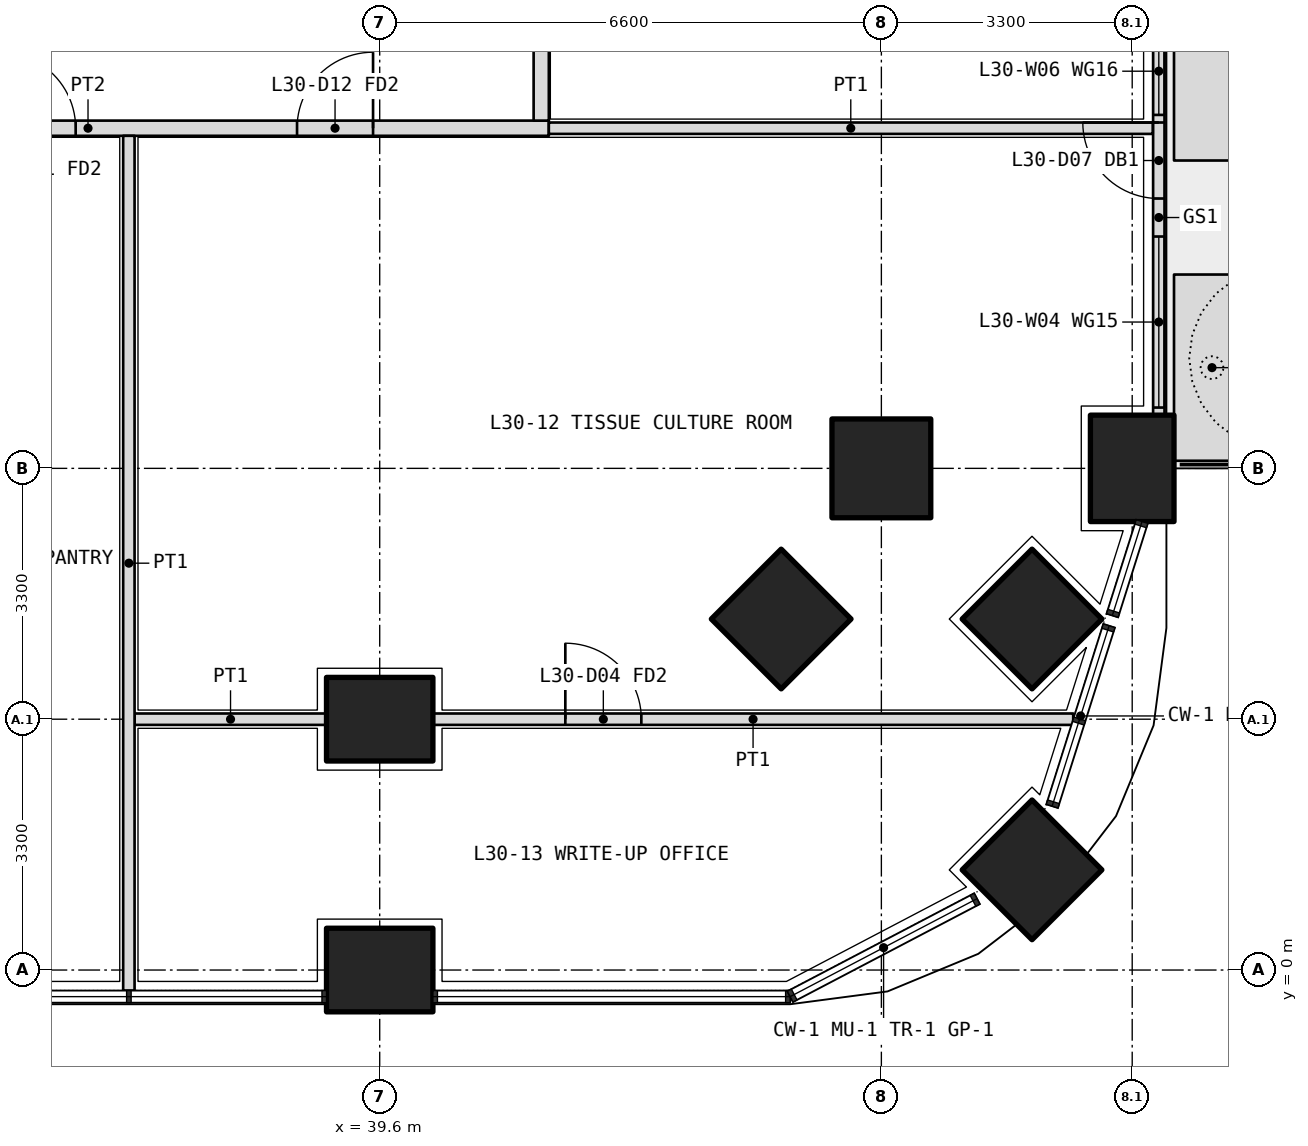
"""IFC4 building model, lengths in metres.
Left out: names, types, materials, properties, quantities, classifications, styles, units other than length and angle.
Written with IfcOpenShell. Run it as: python <this file> out.ifc"""

import sys

from ifc_helpers import new_model, si_unit, direction, frame, frame_2d, origin, origin_2d, place, context, subcontext, project, spatial, polyline, rectangle, outline, extrude, element, fill, save


model = new_model("IFC4")
c1 = context("Model", 3, precision=1e-05, world=origin(), true_north=direction((0.0, 1.0)))
c2 = subcontext(c1, "Body", "Model", "MODEL_VIEW")
j1 = project(units=[si_unit("LENGTHUNIT", "METRE"), si_unit("PLANEANGLEUNIT", "RADIAN")], contexts=[c1])
p1 = place(None, origin())
s1 = spatial("IfcSite", under=j1, at=p1, CompositionType="ELEMENT")
p2 = place(p1, origin())
s2 = spatial("IfcBuilding", under=s1, at=p2, CompositionType="ELEMENT")
p3 = place(p2, frame((0.0, 0.0, 132.6)))
s3 = spatial("IfcBuildingStorey", under=s2, at=p3, CompositionType="ELEMENT", Elevation=132.6)
p4 = place(p3, frame((48.182, 1.318, 0.0), z_axis=(0.0, 0.0, 1.0), x_axis=(0.707106781187, 0.707106781187, 0.0)))
e1 = element("IfcColumn", 1, at=p4, inside=s3, PredefinedType="COLUMN", context=c2, shape_type="SweptSolid", body=[
    extrude(rectangle(XDim=1.3, YDim=1.3, at=origin_2d()), origin(), (0.0, 0.0, 1.0), 4.2),
])
for number, where, z_axis, x_axis in (
    (2, (39.6, 0.0, 0.0), (0.0, 0.0, 1.0), (1.0, 0.0, 0.0)),
    (3, (49.5, 6.6, 0.0), (0.0, 0.0, 1.0), (0.0, 1.0, 0.0)),
):
    element("IfcColumn", number, at=place(p3, frame(where, z_axis=z_axis, x_axis=x_axis)), inside=s3, PredefinedType="COLUMN", context=c2, shape_type="SweptSolid", body=[
        extrude(rectangle(XDim=1.4, YDim=1.1, at=origin_2d()), origin(), (0.0, 0.0, 1.0), 4.2),
    ])
for number, where, z_axis, x_axis in (
    (4, (46.2, 6.6, 0.0), (0.0, 0.0, 1.0), (1.0, 0.0, 0.0)),
    (5, (48.182, 4.618, 0.0), (0.0, 0.0, 1.0), (0.707, 0.707, 0.0)),
):
    element("IfcColumn", number, at=place(p3, frame(where, z_axis=z_axis, x_axis=x_axis)), inside=s3, PredefinedType="COLUMN", context=c2, shape_type="SweptSolid", body=[
        extrude(rectangle(XDim=1.3, YDim=1.3, at=origin_2d()), origin(), (0.0, 0.0, 1.0), 4.2),
    ])
p5 = place(p3, frame((39.6, 3.3, 0.0), z_axis=(0.0, 0.0, 1.0), x_axis=(1.0, 0.0, 0.0)))
e6 = element("IfcColumn", 6, at=p5, inside=s3, PredefinedType="COLUMN", context=c2, shape_type="SweptSolid", body=[
    extrude(rectangle(XDim=1.4, YDim=1.1, at=origin_2d()), origin(), (0.0, 0.0, 1.0), 4.2),
])
p6 = place(p3, frame((44.882, 4.618, 0.0), z_axis=(0.0, 0.0, 1.0), x_axis=(0.707106781187, 0.707106781187, 0.0)))
e7 = element("IfcColumn", 7, at=p6, inside=s3, PredefinedType="COLUMN", context=c2, shape_type="SweptSolid", body=[
    extrude(rectangle(XDim=1.3, YDim=1.3, at=origin_2d()), origin(), (0.0, 0.0, 1.0), 4.2),
])
p7 = place(p3, origin())
e8 = element("IfcWall", 8, at=p7, inside=s3, PredefinedType="USERDEFINED", context=c2, shape_type="SweptSolid", body=[
    extrude(outline(polyline([(50.05, 6.7), (51.05, 6.7), (51.05, 9.15), (50.05, 9.15), (50.05, 6.7)]), holes=[polyline([(50.2, 6.85), (50.9, 6.85), (50.9, 9.0), (50.2, 9.0), (50.2, 6.85)])]), origin(), (0.0, 0.0, 1.0), 1.05),
])
p8 = place(p3, origin())
e9 = element("IfcWall", 9, at=p8, inside=s3, PredefinedType="USERDEFINED", context=c2, shape_type="SweptSolid", body=[
    extrude(outline(polyline([(50.05, 10.65), (51.05, 10.65), (51.05, 19.7), (50.05, 19.7), (50.05, 10.65)]), holes=[polyline([(50.2, 10.8), (50.9, 10.8), (50.9, 19.55), (50.2, 19.55), (50.2, 10.8)])]), origin(), (0.0, 0.0, 1.0), 1.05),
])
p9 = place(p3, frame((49.85, 7.3, 0.0), z_axis=(0.0, 0.0, 1.0), x_axis=(0.0, 1.0, 0.0)))
e10 = element("IfcWall", 10, at=p9, inside=s3, PredefinedType="SOLIDWALL", context=c2, shape_type="SweptSolid", body=[
    extrude(rectangle(XDim=5.2, YDim=0.15, at=frame_2d((2.6, 0.0))), origin(), (0.0, 0.0, 1.0), 2.7),
])
p10 = place(p9, frame((2.85, 0.0, 0.0)))
e11 = element("IfcOpeningElement", 11, at=p10, cuts=e10, PredefinedType="OPENING", context=c2, shape_type="SweptSolid", body=[
    extrude(rectangle(XDim=1.0, YDim=2.4, at=frame_2d((0.5, 1.2))), frame((0.0, 0.085, 0.0), z_axis=(0.0, -1.0, 0.0), x_axis=(1.0, 0.0, 0.0)), (0.0, 0.0, 1.0), 0.17),
])
p11 = place(p9, frame((0.1, 0.0, 0.1)))
e12 = element("IfcOpeningElement", 12, at=p11, cuts=e10, PredefinedType="OPENING", context=c2, shape_type="SweptSolid", body=[
    extrude(rectangle(XDim=2.25, YDim=2.3, at=frame_2d((1.125, 1.15))), frame((0.0, 0.085, 0.0), z_axis=(0.0, -1.0, 0.0), x_axis=(1.0, 0.0, 0.0)), (0.0, 0.0, 1.0), 0.17),
])
p12 = place(p9, frame((3.95, 0.0, 0.1)))
e13 = element("IfcOpeningElement", 13, at=p12, cuts=e10, PredefinedType="OPENING", context=c2, shape_type="SweptSolid", body=[
    extrude(rectangle(XDim=1.15, YDim=2.3, at=frame_2d((0.575, 1.15))), frame((0.0, 0.085, 0.0), z_axis=(0.0, -1.0, 0.0), x_axis=(1.0, 0.0, 0.0)), (0.0, 0.0, 1.0), 0.17),
])
p13 = place(p3, frame((29.7, 11.075, 0.0), z_axis=(0.0, 0.0, 1.0), x_axis=(1.0, 0.0, 0.0)))
e14 = element("IfcWall", 14, at=p13, inside=s3, PredefinedType="PARTITIONING", context=c2, shape_type="SweptSolid", body=[
    extrude(rectangle(XDim=12.125, YDim=0.2, at=frame_2d((6.062, 0.0))), origin(), (0.0, 0.0, 1.0), 2.85),
])
p14 = place(p13, frame((1.6, 0.0, 0.0)))
e15 = element("IfcOpeningElement", 15, at=p14, cuts=e14, PredefinedType="OPENING", context=c2, shape_type="SweptSolid", body=[
    extrude(rectangle(XDim=1.0, YDim=2.1, at=frame_2d((0.5, 1.05))), frame((0.0, 0.11, 0.0), z_axis=(0.0, -1.0, 0.0), x_axis=(1.0, 0.0, 0.0)), (0.0, 0.0, 1.0), 0.22),
])
p15 = place(p13, frame((4.9, 0.0, 0.0)))
e16 = element("IfcOpeningElement", 16, at=p15, cuts=e14, PredefinedType="OPENING", context=c2, shape_type="SweptSolid", body=[
    extrude(rectangle(XDim=1.0, YDim=2.1, at=frame_2d((0.5, 1.05))), frame((0.0, 0.11, 0.0), z_axis=(0.0, -1.0, 0.0), x_axis=(1.0, 0.0, 0.0)), (0.0, 0.0, 1.0), 0.22),
])
p16 = place(p13, frame((8.812, 0.0, 0.0)))
e17 = element("IfcOpeningElement", 17, at=p16, cuts=e14, PredefinedType="OPENING", context=c2, shape_type="SweptSolid", body=[
    extrude(rectangle(XDim=1.0, YDim=2.1, at=frame_2d((0.5, 1.05))), frame((0.0, 0.11, 0.0), z_axis=(0.0, -1.0, 0.0), x_axis=(1.0, 0.0, 0.0)), (0.0, 0.0, 1.0), 0.22),
])
p17 = place(p3, frame((41.725, 11.175, 0.0), z_axis=(0.0, 0.0, 1.0), x_axis=(0.0, 1.0, 0.0)))
e18 = element("IfcWall", 18, at=p17, inside=s3, PredefinedType="PARTITIONING", context=c2, shape_type="SweptSolid", body=[
    extrude(rectangle(XDim=27.625, YDim=0.2, at=frame_2d((13.812, 0.0))), origin(), (0.0, 0.0, 1.0), 2.85),
])
p18 = place(p17, frame((3.762, 0.0, 0.0)))
e19 = element("IfcOpeningElement", 19, at=p18, cuts=e18, PredefinedType="OPENING", context=c2, shape_type="SweptSolid", body=[
    extrude(rectangle(XDim=1.0, YDim=2.1, at=frame_2d((0.5, 1.05))), frame((0.0, 0.11, 0.0), z_axis=(0.0, -1.0, 0.0), x_axis=(1.0, 0.0, 0.0)), (0.0, 0.0, 1.0), 0.22),
])
p19 = place(p17, frame((9.625, 0.0, 0.0)))
e20 = element("IfcOpeningElement", 20, at=p19, cuts=e18, PredefinedType="OPENING", context=c2, shape_type="SweptSolid", body=[
    extrude(rectangle(XDim=1.0, YDim=2.1, at=frame_2d((0.5, 1.05))), frame((0.0, 0.11, 0.0), z_axis=(0.0, -1.0, 0.0), x_axis=(1.0, 0.0, 0.0)), (0.0, 0.0, 1.0), 0.22),
])
p20 = place(p17, frame((12.975, 0.0, 0.0)))
e21 = element("IfcOpeningElement", 21, at=p20, cuts=e18, PredefinedType="OPENING", context=c2, shape_type="SweptSolid", body=[
    extrude(rectangle(XDim=0.9, YDim=2.1, at=frame_2d((0.45, 1.05))), frame((0.0, 0.11, 0.0), z_axis=(0.0, -1.0, 0.0), x_axis=(1.0, 0.0, 0.0)), (0.0, 0.0, 1.0), 0.22),
])
p21 = place(p17, frame((19.675, 0.0, 0.0)))
e22 = element("IfcOpeningElement", 22, at=p21, cuts=e18, PredefinedType="OPENING", context=c2, shape_type="SweptSolid", body=[
    extrude(rectangle(XDim=1.0, YDim=2.1, at=frame_2d((0.5, 1.05))), frame((0.0, 0.11, 0.0), z_axis=(0.0, -1.0, 0.0), x_axis=(1.0, 0.0, 0.0)), (0.0, 0.0, 1.0), 0.22),
])
p22 = place(p17, frame((25.925, 0.0, 0.0)))
e23 = element("IfcOpeningElement", 23, at=p22, cuts=e18, PredefinedType="OPENING", context=c2, shape_type="SweptSolid", body=[
    extrude(rectangle(XDim=1.0, YDim=2.1, at=frame_2d((0.5, 1.05))), frame((0.0, 0.11, 0.0), z_axis=(0.0, -1.0, 0.0), x_axis=(1.0, 0.0, 0.0)), (0.0, 0.0, 1.0), 0.22),
])
p23 = place(p3, frame((49.77, 11.075, 0.0), z_axis=(0.0, 0.0, 1.0), x_axis=(-1.0, 0.0, 0.0)))
e24 = element("IfcWall", 24, at=p23, inside=s3, PredefinedType="PARTITIONING", context=c2, shape_type="SweptSolid", body=[
    extrude(rectangle(XDim=7.945, YDim=0.15, at=frame_2d((3.973, 0.0))), origin(), (0.0, 0.0, 1.0), 2.7),
])
p24 = place(p3, frame((36.375, 3.3, 0.0), z_axis=(0.0, 0.0, 1.0), x_axis=(1.0, 0.0, 0.0)))
e25 = element("IfcWall", 25, at=p24, inside=s3, PredefinedType="PARTITIONING", context=c2, shape_type="SweptSolid", body=[
    extrude(rectangle(XDim=2.525, YDim=0.15, at=frame_2d((1.262, 0.0))), origin(), (0.0, 0.0, 1.0), 2.85),
])
p25 = place(p3, frame((40.3, 3.3, 0.0), z_axis=(0.0, 0.0, 1.0), x_axis=(1.0, 0.0, 0.0)))
e26 = element("IfcWall", 26, at=p25, inside=s3, PredefinedType="PARTITIONING", context=c2, shape_type="SweptSolid", body=[
    extrude(rectangle(XDim=8.424, YDim=0.15, at=frame_2d((4.212, 0.0))), origin(), (0.0, 0.0, 1.0), 2.7),
])
p26 = place(p25, frame((1.742, 0.0, 0.0)))
e27 = element("IfcOpeningElement", 27, at=p26, cuts=e26, PredefinedType="OPENING", context=c2, shape_type="SweptSolid", body=[
    extrude(rectangle(XDim=1.0, YDim=2.1, at=frame_2d((0.5, 1.05))), frame((0.0, 0.085, 0.0), z_axis=(0.0, -1.0, 0.0), x_axis=(1.0, 0.0, 0.0)), (0.0, 0.0, 1.0), 0.17),
])
p27 = place(p3, frame((36.3, -0.27, 0.0), z_axis=(0.0, 0.0, 1.0), x_axis=(0.0, 1.0, 0.0)))
e28 = element("IfcWall", 28, at=p27, inside=s3, PredefinedType="PARTITIONING", context=c2, shape_type="SweptSolid", body=[
    extrude(rectangle(XDim=11.245, YDim=0.15, at=frame_2d((5.623, 0.0))), origin(), (0.0, 0.0, 1.0), 2.7),
])
p28 = place(p10, origin())
e29 = element("IfcDoor", 29, at=p28, inside=s3, OperationType="SINGLE_SWING_RIGHT", PredefinedType="DOOR", context=c2, shape_type="SweptSolid", body=[
    extrude(rectangle(XDim=1.0, YDim=2.4, at=frame_2d((0.5, 1.2))), frame((0.0, 0.025, 0.0), z_axis=(0.0, -1.0, 0.0), x_axis=(1.0, 0.0, 0.0)), (0.0, 0.0, 1.0), 0.05),
])
fill(e11, e29)
p29 = place(p11, origin())
e30 = element("IfcWindow", 30, at=p29, inside=s3, PartitioningType="SINGLE_PANEL", PredefinedType="WINDOW", context=c2, shape_type="SweptSolid", body=[
    extrude(rectangle(XDim=2.25, YDim=2.3, at=frame_2d((1.125, 1.15))), frame((0.0, 0.03, 0.0), z_axis=(0.0, -1.0, 0.0), x_axis=(1.0, 0.0, 0.0)), (0.0, 0.0, 1.0), 0.06),
])
fill(e12, e30)
p30 = place(p12, origin())
e31 = element("IfcWindow", 31, at=p30, inside=s3, PartitioningType="SINGLE_PANEL", PredefinedType="WINDOW", context=c2, shape_type="SweptSolid", body=[
    extrude(rectangle(XDim=1.15, YDim=2.3, at=frame_2d((0.575, 1.15))), frame((0.0, 0.03, 0.0), z_axis=(0.0, -1.0, 0.0), x_axis=(1.0, 0.0, 0.0)), (0.0, 0.0, 1.0), 0.06),
])
fill(e13, e31)
p31 = place(p15, origin())
e32 = element("IfcDoor", 32, at=p31, inside=s3, OperationType="SINGLE_SWING_LEFT", PredefinedType="DOOR", context=c2, shape_type="SweptSolid", body=[
    extrude(rectangle(XDim=1.0, YDim=2.1, at=frame_2d((0.5, 1.05))), frame((0.0, 0.025, 0.0), z_axis=(0.0, -1.0, 0.0), x_axis=(1.0, 0.0, 0.0)), (0.0, 0.0, 1.0), 0.05),
])
fill(e16, e32)
p32 = place(p16, origin())
e33 = element("IfcDoor", 33, at=p32, inside=s3, OperationType="SINGLE_SWING_RIGHT", PredefinedType="DOOR", context=c2, shape_type="SweptSolid", body=[
    extrude(rectangle(XDim=1.0, YDim=2.1, at=frame_2d((0.5, 1.05))), frame((0.0, 0.025, 0.0), z_axis=(0.0, -1.0, 0.0), x_axis=(1.0, 0.0, 0.0)), (0.0, 0.0, 1.0), 0.05),
])
fill(e17, e33)
p33 = place(p26, origin())
e34 = element("IfcDoor", 34, at=p33, inside=s3, OperationType="SINGLE_SWING_LEFT", PredefinedType="DOOR", context=c2, shape_type="SweptSolid", body=[
    extrude(rectangle(XDim=1.0, YDim=2.1, at=frame_2d((0.5, 1.05))), frame((0.0, 0.025, 0.0), z_axis=(0.0, -1.0, 0.0), x_axis=(1.0, 0.0, 0.0)), (0.0, 0.0, 1.0), 0.05),
])
fill(e27, e34)
save(model, sys.argv[1])
